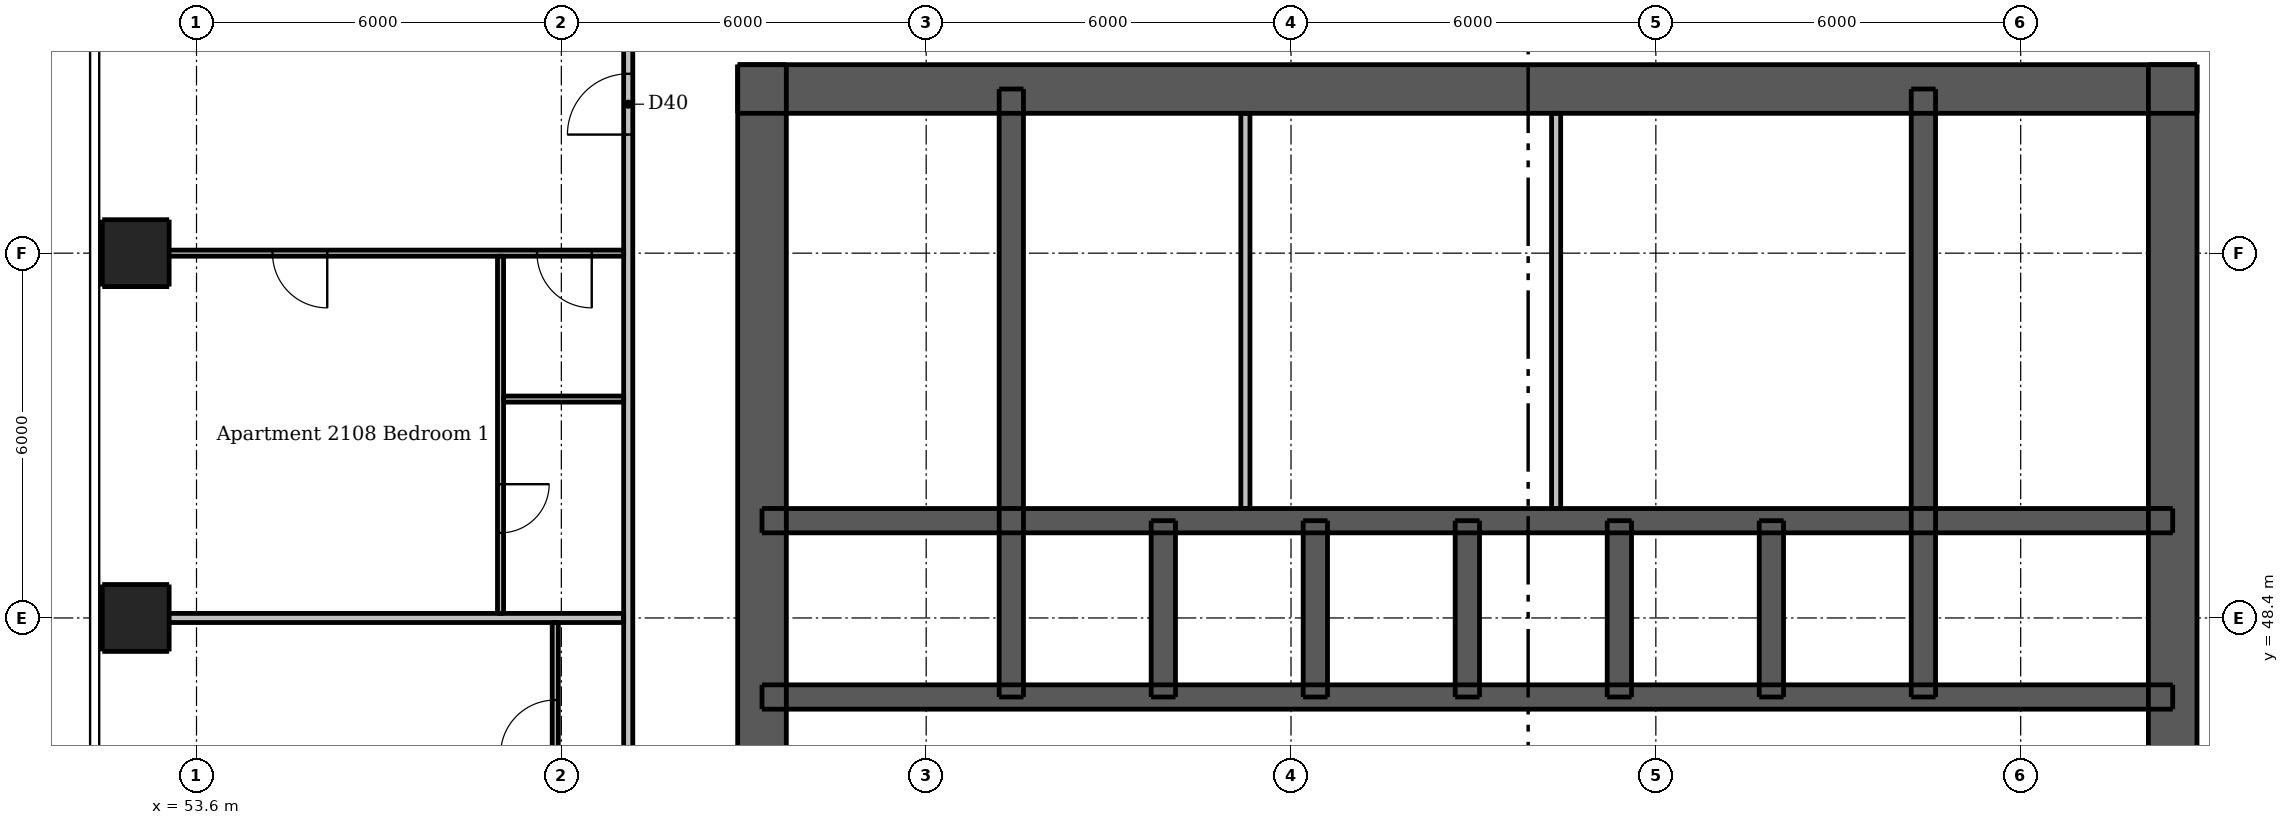
"""IFC4 building model, lengths in metres.
Left out: names, types, materials, properties, quantities, classifications, styles, units other than length and angle.
Written with IfcOpenShell. Run it as: python <this file> out.ifc"""

import sys

from ifc_helpers import new_model, si_unit, direction, frame, frame_2d, origin, origin_2d, place, context, subcontext, project, spatial, rectangle, extrude, element, fill, save


model = new_model("IFC4")
c1 = context("Model", 3, precision=1e-05, world=origin(), true_north=direction((0.0, 1.0)))
c2 = subcontext(c1, "Body", "Model", "MODEL_VIEW")
j1 = project(units=[si_unit("LENGTHUNIT", "METRE"), si_unit("PLANEANGLEUNIT", "RADIAN")], contexts=[c1])
p1 = place(None, origin())
s1 = spatial("IfcSite", under=j1, at=p1, CompositionType="ELEMENT")
p2 = place(p1, origin())
s2 = spatial("IfcBuilding", under=s1, at=p2, CompositionType="ELEMENT")
p3 = place(p2, frame((0.0, 0.0, 82.0)))
s3 = spatial("IfcBuildingStorey", under=s2, at=p3, CompositionType="ELEMENT", Elevation=82.0)
p4 = place(p3, frame((62.5, 57.1, 0.0), z_axis=(0.0, 0.0, 1.0), x_axis=(1.0, 0.0, 0.0)))
e1 = element("IfcWall", 1, at=p4, inside=s3, PredefinedType="SHEAR", context=c2, shape_type="SweptSolid", body=[
    extrude(rectangle(XDim=24.0, YDim=0.8, at=frame_2d((12.0, 0.0))), origin(), (0.0, 0.0, 1.0), 3.05),
])
p5 = place(p4, frame((20.9, 0.0, 0.0)))
e2 = element("IfcOpeningElement", 2, at=p5, cuts=e1, PredefinedType="OPENING", context=c2, shape_type="SweptSolid", body=[
    extrude(rectangle(XDim=1.1, YDim=2.1, at=frame_2d((0.55, 1.05))), frame((0.0, 0.41, 0.0), z_axis=(0.0, -1.0, 0.0), x_axis=(1.0, 0.0, 0.0)), (0.0, 0.0, 1.0), 0.82),
])
p6 = place(p4, frame((2.0, 0.0, 0.0)))
e3 = element("IfcOpeningElement", 3, at=p6, cuts=e1, PredefinedType="OPENING", context=c2, shape_type="SweptSolid", body=[
    extrude(rectangle(XDim=1.1, YDim=2.1, at=frame_2d((0.55, 1.05))), frame((0.0, 0.41, 0.0), z_axis=(0.0, -1.0, 0.0), x_axis=(1.0, 0.0, 0.0)), (0.0, 0.0, 1.0), 0.82),
])
p7 = place(p4, frame((6.075, 0.0, 0.0)))
e4 = element("IfcOpeningElement", 4, at=p7, cuts=e1, PredefinedType="OPENING", context=c2, shape_type="SweptSolid", body=[
    extrude(rectangle(XDim=0.9, YDim=2.1, at=frame_2d((0.45, 1.05))), frame((0.0, 0.41, 0.0), z_axis=(0.0, -1.0, 0.0), x_axis=(1.0, 0.0, 0.0)), (0.0, 0.0, 1.0), 0.82),
])
p8 = place(p4, frame((10.455, 0.0, 0.0)))
e5 = element("IfcOpeningElement", 5, at=p8, cuts=e1, PredefinedType="OPENING", context=c2, shape_type="SweptSolid", body=[
    extrude(rectangle(XDim=0.9, YDim=2.1, at=frame_2d((0.45, 1.05))), frame((0.0, 0.41, 0.0), z_axis=(0.0, -1.0, 0.0), x_axis=(1.0, 0.0, 0.0)), (0.0, 0.0, 1.0), 0.82),
])
p9 = place(p4, frame((15.93, 0.0, 0.0)))
e6 = element("IfcOpeningElement", 6, at=p9, cuts=e1, PredefinedType="OPENING", context=c2, shape_type="SweptSolid", body=[
    extrude(rectangle(XDim=0.9, YDim=2.1, at=frame_2d((0.45, 1.05))), frame((0.0, 0.41, 0.0), z_axis=(0.0, -1.0, 0.0), x_axis=(1.0, 0.0, 0.0)), (0.0, 0.0, 1.0), 0.82),
])
p10 = place(p3, frame((62.9, 33.5, 0.0), z_axis=(0.0, 0.0, 1.0), x_axis=(0.0, 1.0, 0.0)))
e7 = element("IfcWall", 7, at=p10, inside=s3, PredefinedType="SHEAR", context=c2, shape_type="SweptSolid", body=[
    extrude(rectangle(XDim=24.0, YDim=0.8, at=frame_2d((12.0, 0.0))), origin(), (0.0, 0.0, 1.0), 3.05),
])
p11 = place(p10, frame((11.2, 0.0, 0.0)))
e8 = element("IfcOpeningElement", 8, at=p11, cuts=e7, PredefinedType="OPENING", context=c2, shape_type="SweptSolid", body=[
    extrude(rectangle(XDim=1.6, YDim=2.1, at=frame_2d((0.8, 1.05))), frame((0.0, 0.41, 0.0), z_axis=(0.0, -1.0, 0.0), x_axis=(1.0, 0.0, 0.0)), (0.0, 0.0, 1.0), 0.82),
])
p12 = place(p3, frame((86.1, 33.5, 0.0), z_axis=(0.0, 0.0, 1.0), x_axis=(0.0, 1.0, 0.0)))
e9 = element("IfcWall", 9, at=p12, inside=s3, PredefinedType="SHEAR", context=c2, shape_type="SweptSolid", body=[
    extrude(rectangle(XDim=24.0, YDim=0.8, at=frame_2d((12.0, 0.0))), origin(), (0.0, 0.0, 1.0), 3.05),
])
p13 = place(p12, frame((11.2, 0.0, 0.0)))
e10 = element("IfcOpeningElement", 10, at=p13, cuts=e9, PredefinedType="OPENING", context=c2, shape_type="SweptSolid", body=[
    extrude(rectangle(XDim=1.6, YDim=2.1, at=frame_2d((0.8, 1.05))), frame((0.0, 0.41, 0.0), z_axis=(0.0, -1.0, 0.0), x_axis=(1.0, 0.0, 0.0)), (0.0, 0.0, 1.0), 0.82),
])
p14 = place(p3, frame((62.9, 47.1, 0.0), z_axis=(0.0, 0.0, 1.0), x_axis=(1.0, 0.0, 0.0)))
e11 = element("IfcWall", 11, at=p14, inside=s3, PredefinedType="SHEAR", context=c2, shape_type="SweptSolid", body=[
    extrude(rectangle(XDim=23.2, YDim=0.4, at=frame_2d((11.6, 0.0))), origin(), (0.0, 0.0, 1.0), 3.05),
])
p15 = place(p14, frame((1.7, 0.0, 0.0)))
e12 = element("IfcOpeningElement", 12, at=p15, cuts=e11, PredefinedType="OPENING", context=c2, shape_type="SweptSolid", body=[
    extrude(rectangle(XDim=0.9, YDim=2.1, at=frame_2d((0.45, 1.05))), frame((0.0, 0.21, 0.0), z_axis=(0.0, -1.0, 0.0), x_axis=(1.0, 0.0, 0.0)), (0.0, 0.0, 1.0), 0.42),
])
p16 = place(p14, frame((20.6, 0.0, 0.0)))
e13 = element("IfcOpeningElement", 13, at=p16, cuts=e11, PredefinedType="OPENING", context=c2, shape_type="SweptSolid", body=[
    extrude(rectangle(XDim=0.9, YDim=2.1, at=frame_2d((0.45, 1.05))), frame((0.0, 0.21, 0.0), z_axis=(0.0, -1.0, 0.0), x_axis=(1.0, 0.0, 0.0)), (0.0, 0.0, 1.0), 0.42),
])
p17 = place(p3, frame((62.9, 50.0, 0.0), z_axis=(0.0, 0.0, 1.0), x_axis=(1.0, 0.0, 0.0)))
e14 = element("IfcWall", 14, at=p17, inside=s3, PredefinedType="SHEAR", context=c2, shape_type="SweptSolid", body=[
    extrude(rectangle(XDim=23.2, YDim=0.4, at=frame_2d((11.6, 0.0))), origin(), (0.0, 0.0, 1.0), 3.05),
])
for number, where, z_axis, x_axis in (
    (15, (67.0, 47.1, 0.0), (0.0, 0.0, 1.0), (0.0, 1.0, 0.0)),
    (16, (82.0, 47.1, 0.0), (0.0, 0.0, 1.0), (0.0, 1.0, 0.0)),
):
    element("IfcWall", number, at=place(p3, frame(where, z_axis=z_axis, x_axis=x_axis)), inside=s3, PredefinedType="SHEAR", context=c2, shape_type="SweptSolid", body=[
        extrude(rectangle(XDim=10.0, YDim=0.4, at=frame_2d((5.0, 0.0))), origin(), (0.0, 0.0, 1.0), 3.05),
    ])
for number, where, z_axis, x_axis in (
    (17, (69.5, 47.1, 0.0), (0.0, 0.0, 1.0), (0.0, 1.0, 0.0)),
    (18, (72.0, 47.1, 0.0), (0.0, 0.0, 1.0), (0.0, 1.0, 0.0)),
    (19, (74.5, 47.1, 0.0), (0.0, 0.0, 1.0), (0.0, 1.0, 0.0)),
    (20, (77.0, 47.1, 0.0), (0.0, 0.0, 1.0), (0.0, 1.0, 0.0)),
    (21, (79.5, 47.1, 0.0), (0.0, 0.0, 1.0), (0.0, 1.0, 0.0)),
):
    element("IfcWall", number, at=place(p3, frame(where, z_axis=z_axis, x_axis=x_axis)), inside=s3, PredefinedType="SHEAR", context=c2, shape_type="SweptSolid", body=[
        extrude(rectangle(XDim=2.9, YDim=0.4, at=frame_2d((1.45, 0.0))), origin(), (0.0, 0.0, 1.0), 3.05),
    ])
for number, where, z_axis, x_axis in (
    (22, (52.6, 48.4, 0.0), (0.0, 0.0, 1.0), (1.0, 0.0, 0.0)),
    (23, (52.6, 54.4, 0.0), (0.0, 0.0, 1.0), (1.0, 0.0, 0.0)),
):
    element("IfcColumn", number, at=place(p3, frame(where, z_axis=z_axis, x_axis=x_axis)), inside=s3, PredefinedType="COLUMN", context=c2, shape_type="SweptSolid", body=[
        extrude(rectangle(XDim=1.1, YDim=1.1, at=origin_2d()), origin(), (0.0, 0.0, 1.0), 3.05),
    ])
for number, where, z_axis, x_axis in (
    (24, (70.85, 50.2, 0.0), (0.0, 0.0, 1.0), (0.0, 1.0, 0.0)),
    (25, (75.96, 50.2, 0.0), (0.0, 0.0, 1.0), (0.0, 1.0, 0.0)),
):
    element("IfcWall", number, at=place(p3, frame(where, z_axis=z_axis, x_axis=x_axis)), inside=s3, PredefinedType="PLUMBINGWALL", context=c2, shape_type="SweptSolid", body=[
        extrude(rectangle(XDim=6.5, YDim=0.15, at=frame_2d((3.25, 0.0))), origin(), (0.0, 0.0, 1.0), 3.05),
    ])
p18 = place(p3, frame((58.6, 54.35, 0.0), z_axis=(0.0, 0.0, 1.0), x_axis=(0.0, -1.0, 0.0)))
e26 = element("IfcWall", 26, at=p18, inside=s3, PredefinedType="PARTITIONING", context=c2, shape_type="SweptSolid", body=[
    extrude(rectangle(XDim=5.875, YDim=0.1, at=frame_2d((2.938, 0.0))), origin(), (0.0, 0.0, 1.0), 3.05),
])
p19 = place(p18, frame((3.75, 0.0, 0.0)))
e27 = element("IfcOpeningElement", 27, at=p19, cuts=e26, PredefinedType="OPENING", context=c2, shape_type="SweptSolid", body=[
    extrude(rectangle(XDim=0.8, YDim=2.1, at=frame_2d((0.4, 1.05))), frame((0.0, 0.06, 0.0), z_axis=(0.0, -1.0, 0.0), x_axis=(1.0, 0.0, 0.0)), (0.0, 0.0, 1.0), 0.12),
])
p20 = place(p3, frame((59.5, 31.65, 0.0), z_axis=(0.0, 0.0, 1.0), x_axis=(0.0, 1.0, 0.0)))
e28 = element("IfcWall", 28, at=p20, inside=s3, PredefinedType="PARTITIONING", context=c2, shape_type="SweptSolid", body=[
    extrude(rectangle(XDim=16.675, YDim=0.1, at=frame_2d((8.337, 0.0))), origin(), (0.0, 0.0, 1.0), 2.51),
])
p21 = place(p20, frame((0.75, 0.0, 0.0)))
e29 = element("IfcOpeningElement", 29, at=p21, cuts=e28, PredefinedType="OPENING", context=c2, shape_type="SweptSolid", body=[
    extrude(rectangle(XDim=0.9, YDim=2.1, at=frame_2d((0.45, 1.05))), frame((0.0, 0.06, 0.0), z_axis=(0.0, -1.0, 0.0), x_axis=(1.0, 0.0, 0.0)), (0.0, 0.0, 1.0), 0.12),
])
p22 = place(p20, frame((3.1, 0.0, 0.0)))
e30 = element("IfcOpeningElement", 30, at=p22, cuts=e28, PredefinedType="OPENING", context=c2, shape_type="SweptSolid", body=[
    extrude(rectangle(XDim=0.9, YDim=2.1, at=frame_2d((0.45, 1.05))), frame((0.0, 0.06, 0.0), z_axis=(0.0, -1.0, 0.0), x_axis=(1.0, 0.0, 0.0)), (0.0, 0.0, 1.0), 0.12),
])
p23 = place(p20, frame((8.5, 0.0, 0.0)))
e31 = element("IfcOpeningElement", 31, at=p23, cuts=e28, PredefinedType="OPENING", context=c2, shape_type="SweptSolid", body=[
    extrude(rectangle(XDim=0.9, YDim=2.1, at=frame_2d((0.45, 1.05))), frame((0.0, 0.06, 0.0), z_axis=(0.0, -1.0, 0.0), x_axis=(1.0, 0.0, 0.0)), (0.0, 0.0, 1.0), 0.12),
])
p24 = place(p20, frame((14.5, 0.0, 0.0)))
e32 = element("IfcOpeningElement", 32, at=p24, cuts=e28, PredefinedType="OPENING", context=c2, shape_type="SweptSolid", body=[
    extrude(rectangle(XDim=0.9, YDim=2.1, at=frame_2d((0.45, 1.05))), frame((0.0, 0.06, 0.0), z_axis=(0.0, -1.0, 0.0), x_axis=(1.0, 0.0, 0.0)), (0.0, 0.0, 1.0), 0.12),
])
p25 = place(p20, frame((5.55, 0.0, 0.0)))
e33 = element("IfcOpeningElement", 33, at=p25, cuts=e28, PredefinedType="OPENING", context=c2, shape_type="SweptSolid", body=[
    extrude(rectangle(XDim=0.8, YDim=2.1, at=frame_2d((0.4, 1.05))), frame((0.0, 0.06, 0.0), z_axis=(0.0, -1.0, 0.0), x_axis=(1.0, 0.0, 0.0)), (0.0, 0.0, 1.0), 0.12),
])
p26 = place(p20, frame((11.55, 0.0, 0.0)))
e34 = element("IfcOpeningElement", 34, at=p26, cuts=e28, PredefinedType="OPENING", context=c2, shape_type="SweptSolid", body=[
    extrude(rectangle(XDim=0.8, YDim=2.1, at=frame_2d((0.4, 1.05))), frame((0.0, 0.06, 0.0), z_axis=(0.0, -1.0, 0.0), x_axis=(1.0, 0.0, 0.0)), (0.0, 0.0, 1.0), 0.12),
])
p27 = place(p3, frame((60.625, 54.4, 0.0), z_axis=(0.0, 0.0, 1.0), x_axis=(-1.0, 0.0, 0.0)))
e35 = element("IfcWall", 35, at=p27, inside=s3, PredefinedType="PARTITIONING", context=c2, shape_type="SweptSolid", body=[
    extrude(rectangle(XDim=8.625, YDim=0.1, at=frame_2d((4.312, 0.0))), origin(), (0.0, 0.0, 1.0), 2.516),
])
p28 = place(p27, frame((0.525, 0.0, 0.0)))
e36 = element("IfcOpeningElement", 36, at=p28, cuts=e35, PredefinedType="OPENING", context=c2, shape_type="SweptSolid", body=[
    extrude(rectangle(XDim=0.9, YDim=2.1, at=frame_2d((0.45, 1.05))), frame((0.0, 0.06, 0.0), z_axis=(0.0, -1.0, 0.0), x_axis=(1.0, 0.0, 0.0)), (0.0, 0.0, 1.0), 0.12),
])
p29 = place(p27, frame((4.875, 0.0, 0.0)))
e37 = element("IfcOpeningElement", 37, at=p29, cuts=e35, PredefinedType="OPENING", context=c2, shape_type="SweptSolid", body=[
    extrude(rectangle(XDim=0.9, YDim=2.1, at=frame_2d((0.45, 1.05))), frame((0.0, 0.06, 0.0), z_axis=(0.0, -1.0, 0.0), x_axis=(1.0, 0.0, 0.0)), (0.0, 0.0, 1.0), 0.12),
])
p30 = place(p3, frame((58.65, 52.0, 0.0), z_axis=(0.0, 0.0, 1.0), x_axis=(1.0, 0.0, 0.0)))
e38 = element("IfcWall", 38, at=p30, inside=s3, PredefinedType="PARTITIONING", context=c2, shape_type="SweptSolid", body=[
    extrude(rectangle(XDim=1.975, YDim=0.1, at=frame_2d((0.988, 0.0))), origin(), (0.0, 0.0, 1.0), 3.05),
])
p31 = place(p3, frame((60.7, 30.325, 0.0), z_axis=(0.0, 0.0, 1.0), x_axis=(0.0, 1.0, 0.0)))
e39 = element("IfcWall", 39, at=p31, inside=s3, PredefinedType="PARTITIONING", context=c2, shape_type="SweptSolid", body=[
    extrude(rectangle(XDim=28.9, YDim=0.15, at=frame_2d((14.45, 0.0))), origin(), (0.0, 0.0, 1.0), 3.05),
])
p32 = place(p31, frame((9.225, 0.0, 0.0)))
e40 = element("IfcOpeningElement", 40, at=p32, cuts=e39, PredefinedType="OPENING", context=c2, shape_type="SweptSolid", body=[
    extrude(rectangle(XDim=1.0, YDim=2.1, at=frame_2d((0.5, 1.05))), frame((0.0, 0.085, 0.0), z_axis=(0.0, -1.0, 0.0), x_axis=(1.0, 0.0, 0.0)), (0.0, 0.0, 1.0), 0.17),
])
p33 = place(p31, frame((26.025, 0.0, 0.0)))
e41 = element("IfcOpeningElement", 41, at=p33, cuts=e39, PredefinedType="OPENING", context=c2, shape_type="SweptSolid", body=[
    extrude(rectangle(XDim=1.0, YDim=2.1, at=frame_2d((0.5, 1.05))), frame((0.0, 0.085, 0.0), z_axis=(0.0, -1.0, 0.0), x_axis=(1.0, 0.0, 0.0)), (0.0, 0.0, 1.0), 0.17),
])
p34 = place(p3, frame((52.0, 48.4, 0.0), z_axis=(0.0, 0.0, 1.0), x_axis=(1.0, 0.0, 0.0)))
e42 = element("IfcWall", 42, at=p34, inside=s3, PredefinedType="PARTITIONING", context=c2, shape_type="SweptSolid", body=[
    extrude(rectangle(XDim=8.625, YDim=0.15, at=frame_2d((4.312, 0.0))), origin(), (0.0, 0.0, 1.0), 2.516),
])
p35 = place(p5, origin())
e43 = element("IfcDoor", 43, at=p35, inside=s3, OperationType="SINGLE_SWING_RIGHT", PredefinedType="DOOR", context=c2, shape_type="SweptSolid", body=[
    extrude(rectangle(XDim=1.1, YDim=2.1, at=frame_2d((0.55, 1.05))), frame((0.0, -0.337, 0.0), z_axis=(0.0, -1.0, 0.0), x_axis=(1.0, 0.0, 0.0)), (0.0, 0.0, 1.0), 0.05),
])
fill(e2, e43)
p36 = place(p6, origin())
e44 = element("IfcDoor", 44, at=p36, inside=s3, OperationType="SINGLE_SWING_LEFT", PredefinedType="DOOR", context=c2, shape_type="SweptSolid", body=[
    extrude(rectangle(XDim=1.1, YDim=2.1, at=frame_2d((0.55, 1.05))), frame((0.0, -0.337, 0.0), z_axis=(0.0, -1.0, 0.0), x_axis=(1.0, 0.0, 0.0)), (0.0, 0.0, 1.0), 0.05),
])
fill(e3, e44)
p37 = place(p15, origin())
e45 = element("IfcDoor", 45, at=p37, inside=s3, OperationType="SINGLE_SWING_LEFT", PredefinedType="DOOR", context=c2, shape_type="SweptSolid", body=[
    extrude(rectangle(XDim=0.9, YDim=2.1, at=frame_2d((0.45, 1.05))), frame((0.0, 0.188, 0.0), z_axis=(0.0, -1.0, 0.0), x_axis=(1.0, 0.0, 0.0)), (0.0, 0.0, 1.0), 0.05),
])
fill(e12, e45)
p38 = place(p16, origin())
e46 = element("IfcDoor", 46, at=p38, inside=s3, OperationType="SINGLE_SWING_LEFT", PredefinedType="DOOR", context=c2, shape_type="SweptSolid", body=[
    extrude(rectangle(XDim=0.9, YDim=2.1, at=frame_2d((0.45, 1.05))), frame((0.0, 0.188, 0.0), z_axis=(0.0, -1.0, 0.0), x_axis=(1.0, 0.0, 0.0)), (0.0, 0.0, 1.0), 0.05),
])
fill(e13, e46)
p39 = place(p7, origin())
e47 = element("IfcDoor", 47, at=p39, inside=s3, OperationType="SINGLE_SWING_RIGHT", PredefinedType="DOOR", context=c2, shape_type="SweptSolid", body=[
    extrude(rectangle(XDim=0.9, YDim=2.1, at=frame_2d((0.45, 1.05))), frame((0.0, -0.337, 0.0), z_axis=(0.0, -1.0, 0.0), x_axis=(1.0, 0.0, 0.0)), (0.0, 0.0, 1.0), 0.05),
])
fill(e4, e47)
p40 = place(p8, origin())
e48 = element("IfcDoor", 48, at=p40, inside=s3, OperationType="SINGLE_SWING_RIGHT", PredefinedType="DOOR", context=c2, shape_type="SweptSolid", body=[
    extrude(rectangle(XDim=0.9, YDim=2.1, at=frame_2d((0.45, 1.05))), frame((0.0, -0.337, 0.0), z_axis=(0.0, -1.0, 0.0), x_axis=(1.0, 0.0, 0.0)), (0.0, 0.0, 1.0), 0.05),
])
fill(e5, e48)
p41 = place(p9, origin())
e49 = element("IfcDoor", 49, at=p41, inside=s3, OperationType="SINGLE_SWING_RIGHT", PredefinedType="DOOR", context=c2, shape_type="SweptSolid", body=[
    extrude(rectangle(XDim=0.9, YDim=2.1, at=frame_2d((0.45, 1.05))), frame((0.0, -0.337, 0.0), z_axis=(0.0, -1.0, 0.0), x_axis=(1.0, 0.0, 0.0)), (0.0, 0.0, 1.0), 0.05),
])
fill(e6, e49)
p42 = place(p24, origin())
e50 = element("IfcDoor", 50, at=p42, inside=s3, OperationType="SINGLE_SWING_LEFT", PredefinedType="DOOR", context=c2, shape_type="SweptSolid", body=[
    extrude(rectangle(XDim=0.9, YDim=2.1, at=frame_2d((0.45, 1.05))), frame((0.0, 0.025, 0.0), z_axis=(0.0, -1.0, 0.0), x_axis=(1.0, 0.0, 0.0)), (0.0, 0.0, 1.0), 0.05),
])
fill(e32, e50)
p43 = place(p33, origin())
e51 = element("IfcDoor", 51, at=p43, inside=s3, OperationType="SINGLE_SWING_LEFT", PredefinedType="DOOR", context=c2, shape_type="SweptSolid", body=[
    extrude(rectangle(XDim=1.0, YDim=2.1, at=frame_2d((0.5, 1.05))), frame((0.0, 0.025, 0.0), z_axis=(0.0, -1.0, 0.0), x_axis=(1.0, 0.0, 0.0)), (0.0, 0.0, 1.0), 0.05),
])
fill(e41, e51)
p44 = place(p28, origin())
e52 = element("IfcDoor", 52, at=p44, inside=s3, OperationType="SINGLE_SWING_LEFT", PredefinedType="DOOR", context=c2, shape_type="SweptSolid", body=[
    extrude(rectangle(XDim=0.9, YDim=2.1, at=frame_2d((0.45, 1.05))), frame((0.0, 0.025, 0.0), z_axis=(0.0, -1.0, 0.0), x_axis=(1.0, 0.0, 0.0)), (0.0, 0.0, 1.0), 0.05),
])
fill(e36, e52)
p45 = place(p29, origin())
e53 = element("IfcDoor", 53, at=p45, inside=s3, OperationType="SINGLE_SWING_LEFT", PredefinedType="DOOR", context=c2, shape_type="SweptSolid", body=[
    extrude(rectangle(XDim=0.9, YDim=2.1, at=frame_2d((0.45, 1.05))), frame((0.0, 0.025, 0.0), z_axis=(0.0, -1.0, 0.0), x_axis=(1.0, 0.0, 0.0)), (0.0, 0.0, 1.0), 0.05),
])
fill(e37, e53)
p46 = place(p19, origin())
e54 = element("IfcDoor", 54, at=p46, inside=s3, OperationType="SINGLE_SWING_LEFT", PredefinedType="DOOR", context=c2, shape_type="SweptSolid", body=[
    extrude(rectangle(XDim=0.8, YDim=2.1, at=frame_2d((0.4, 1.05))), frame((0.0, 0.025, 0.0), z_axis=(0.0, -1.0, 0.0), x_axis=(1.0, 0.0, 0.0)), (0.0, 0.0, 1.0), 0.05),
])
fill(e27, e54)
save(model, sys.argv[1])
